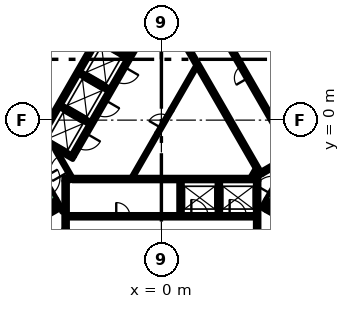
"""IFC4 building model, lengths in metres.
Left out: names, types, materials, properties, quantities, classifications, styles, units other than length and angle.
Written with IfcOpenShell. Run it as: python <this file> out.ifc"""

import sys

from ifc_helpers import new_model, si_unit, direction, frame, frame_2d, origin, place, context, subcontext, project, spatial, polyline, rectangle, outline, extrude, element, fill, save


model = new_model("IFC4")
c1 = context("Model", 3, precision=1e-05, world=origin(), true_north=direction((0.0, 1.0)))
c2 = subcontext(c1, "Body", "Model", "MODEL_VIEW")
j1 = project(units=[si_unit("LENGTHUNIT", "METRE"), si_unit("PLANEANGLEUNIT", "RADIAN")], contexts=[c1])
p1 = place(None, origin())
s1 = spatial("IfcSite", under=j1, at=p1, CompositionType="ELEMENT")
p2 = place(p1, origin())
s2 = spatial("IfcBuilding", under=s1, at=p2, CompositionType="ELEMENT")
p3 = place(p2, origin())
s3 = spatial("IfcBuildingStorey", under=s2, at=p3, CompositionType="ELEMENT", Elevation=0.0)
p4 = place(p3, frame((6.776, 13.364, -1.8), z_axis=(0.0, 0.0, 1.0), x_axis=(0.500004177138, -0.8660229921, 0.0)))
e1 = element("IfcWall", 1, at=p4, inside=s3, PredefinedType="SOLIDWALL", context=c2, shape_type="SweptSolid", body=[
    extrude(rectangle(XDim=20.204, YDim=0.9, at=frame_2d((10.102, 0.0))), origin(), (0.0, 0.0, 1.0), 7.8),
])
p5 = place(p3, frame((-15.36, -1.503, -1.8), z_axis=(0.0, 0.0, 1.0), x_axis=(0.50000389221, 0.866023156604, 0.0)))
e2 = element("IfcWall", 2, at=p5, inside=s3, PredefinedType="SOLIDWALL", context=c2, shape_type="SweptSolid", body=[
    extrude(rectangle(XDim=21.0, YDim=0.9, at=frame_2d((10.5, 0.0))), origin(), (0.0, 0.0, 1.0), 7.8),
])
p6 = place(p3, frame((12.84, -9.261, 0.0), z_axis=(0.0, 0.0, 1.0), x_axis=(-0.866013990052, 0.500019768644, 0.0)))
e3 = element("IfcWall", 3, at=p6, inside=s3, PredefinedType="SOLIDWALL", context=c2, shape_type="SweptSolid", body=[
    extrude(rectangle(XDim=6.8, YDim=0.25, at=frame_2d((3.4, 0.0))), origin(), (0.0, 0.0, 1.0), 6.0),
])
p7 = place(p3, frame((6.78, -5.906, 0.0), z_axis=(0.0, 0.0, 1.0), x_axis=(0.500223362819, 0.865896406789, 0.0)))
e4 = element("IfcWall", 4, at=p7, inside=s3, PredefinedType="SOLIDWALL", context=c2, shape_type="SweptSolid", body=[
    extrude(rectangle(XDim=0.675, YDim=0.25, at=frame_2d((0.337, 0.0))), origin(), (0.0, 0.0, 1.0), 6.0),
])
p8 = place(p3, frame((-12.84, -9.261, 0.0), z_axis=(0.0, 0.0, 1.0), x_axis=(0.866016039709, 0.500016218704, 0.0)))
e5 = element("IfcWall", 5, at=p8, inside=s3, PredefinedType="SOLIDWALL", context=c2, shape_type="SweptSolid", body=[
    extrude(rectangle(XDim=7.05, YDim=0.25, at=frame_2d((3.525, 0.0))), origin(), (0.0, 0.0, 1.0), 6.0),
])
p9 = place(p3, frame((-6.905, -5.69, 0.0), z_axis=(0.0, 0.0, 1.0), x_axis=(-0.500402024738, 0.865793170242, 0.0)))
e6 = element("IfcWall", 6, at=p9, inside=s3, PredefinedType="SOLIDWALL", context=c2, shape_type="SweptSolid", body=[
    extrude(rectangle(XDim=0.425, YDim=0.25, at=frame_2d((0.212, 0.0))), origin(), (0.0, 0.0, 1.0), 6.0),
])
p10 = place(p3, frame((-5.845, -3.875, -1.8), z_axis=(0.0, 0.0, 1.0), x_axis=(1.0, 0.0, 0.0)))
e7 = element("IfcWall", 7, at=p10, inside=s3, PredefinedType="SOLIDWALL", context=c2, shape_type="SweptSolid", body=[
    extrude(rectangle(XDim=12.27, YDim=0.25, at=frame_2d((6.135, 0.0))), origin(), (0.0, 0.0, 1.0), 7.8),
])
p11 = place(p3, frame((-6.425, -3.875, -1.8), z_axis=(0.0, 0.0, 1.0), x_axis=(1.0, 0.0, 0.0)))
e8 = element("IfcWall", 8, at=p11, inside=s3, PredefinedType="SOLIDWALL", context=c2, shape_type="SweptSolid", body=[
    extrude(rectangle(XDim=0.428, YDim=0.25, at=frame_2d((0.214, 0.0))), origin(), (0.0, 0.0, 1.0), 7.8),
])
p12 = place(p3, frame((6.3, -7.268, -1.8), z_axis=(0.0, 0.0, 1.0), x_axis=(0.0, 1.0, 0.0)))
e9 = element("IfcWall", 9, at=p12, inside=s3, PredefinedType="SOLIDWALL", context=c2, shape_type="SweptSolid", body=[
    extrude(rectangle(XDim=3.268, YDim=0.25, at=frame_2d((1.634, 0.0))), origin(), (0.0, 0.0, 1.0), 7.8),
])
for number, where, z_axis, x_axis in (
    (10, (3.78, -4.0, -1.8), (0.0, 0.0, 1.0), (0.0, -1.0, 0.0)),
    (11, (1.26, -4.0, -1.8), (0.0, 0.0, 1.0), (0.0, -1.0, 0.0)),
):
    element("IfcWall", number, at=place(p3, frame(where, z_axis=z_axis, x_axis=x_axis)), inside=s3, PredefinedType="SOLIDWALL", context=c2, shape_type="SweptSolid", body=[
        extrude(rectangle(XDim=2.2, YDim=0.25, at=frame_2d((1.1, 0.0))), origin(), (0.0, 0.0, 1.0), 7.8),
    ])
p13 = place(p3, frame((-6.3, -4.0, -1.8), z_axis=(0.0, 0.0, 1.0), x_axis=(0.0, -1.0, 0.0)))
e12 = element("IfcWall", 12, at=p13, inside=s3, PredefinedType="SOLIDWALL", context=c2, shape_type="SweptSolid", body=[
    extrude(rectangle(XDim=3.154, YDim=0.25, at=frame_2d((1.577, 0.0))), origin(), (0.0, 0.0, 1.0), 7.8),
])
p14 = place(p3, frame((0.0, 0.0, -1.8)))
e13 = element("IfcWall", 13, at=p14, inside=s3, PredefinedType="SOLIDWALL", context=c2, shape_type="SweptSolid", body=[
    extrude(outline(polyline([(0.335, 6.925), (0.335, 7.075), (0.335, 7.075), (0.335, 7.075), (0.245, 7.075), (0.079, 7.363), (0.035, 7.439), (0.252, 7.564), (0.377, 7.348), (6.552, -3.348), (6.677, -3.564), (6.46, -3.689), (4.897, -0.981), (0.332, 6.925), (0.335, 6.925), (0.335, 6.925), (0.335, 6.925)])), origin(), (0.0, 0.0, 1.0), 7.8),
])
p15 = place(p3, frame((6.614, -3.456, -1.8), z_axis=(0.0, 0.0, 1.0), x_axis=(0.86602447079, 0.500001615989, 0.0)))
e14 = element("IfcWall", 14, at=p15, inside=s3, PredefinedType="SOLIDWALL", context=c2, shape_type="SweptSolid", body=[
    extrude(rectangle(XDim=3.154, YDim=0.25, at=frame_2d((1.577, 0.0))), origin(), (0.0, 0.0, 1.0), 7.8),
])
p16 = place(p3, frame((-8.06, -1.311, -1.8), z_axis=(0.0, 0.0, 1.0), x_axis=(0.50000273126, 0.866023826885, 0.0)))
e15 = element("IfcWall", 15, at=p16, inside=s3, PredefinedType="SOLIDWALL", context=c2, shape_type="SweptSolid", body=[
    extrude(rectangle(XDim=10.33, YDim=0.25, at=frame_2d((5.165, 0.0))), origin(), (0.0, 0.0, 1.0), 7.8),
])
for number, where, z_axis, x_axis in (
    (16, (-2.204, 4.182, -1.8), (0.0, 0.0, 1.0), (-0.866, 0.5, 0.0)),
    (17, (-5.369, 3.1, -1.8), (0.0, 0.0, 1.0), (0.866, -0.5, 0.0)),
    (18, (-4.724, -0.182, -1.8), (0.0, 0.0, 1.0), (-0.866, 0.5, 0.0)),
):
    element("IfcWall", number, at=place(p3, frame(where, z_axis=z_axis, x_axis=x_axis)), inside=s3, PredefinedType="SOLIDWALL", context=c2, shape_type="SweptSolid", body=[
        extrude(rectangle(XDim=2.2, YDim=0.25, at=frame_2d((1.1, 0.0))), origin(), (0.0, 0.0, 1.0), 7.8),
    ])
e19 = element("IfcWall", 19, at=p14, inside=s3, PredefinedType="SOLIDWALL", context=c2, shape_type="SweptSolid", body=[
    extrude(outline(polyline([(-5.922, -2.257), (-5.922, -2.257), (-5.705, -2.382), (-5.83, -2.598), (-6.829, -2.021), (-6.88, -1.934), (-6.88, -1.934), (-6.93, -1.963), (-7.952, -1.373), (-7.827, -1.156), (-5.922, -2.257)])), origin(), (0.0, 0.0, 1.0), 7.8),
])
p17 = place(p3, frame((-6.48, -6.027, -1.8), z_axis=(0.0, 0.0, 1.0), x_axis=(-0.499927229454, 0.866067413802, 0.0)))
e20 = element("IfcWall", 20, at=p17, inside=s3, PredefinedType="PARTITIONING", context=c2, shape_type="SweptSolid", body=[
    extrude(rectangle(XDim=0.929, YDim=0.15, at=frame_2d((0.464, 0.0))), origin(), (0.0, 0.0, 1.0), 7.8),
])
p18 = place(p3, frame((6.945, -5.222, 0.0), z_axis=(0.0, 0.0, 1.0), x_axis=(-0.499818422106, -0.866130212453, 0.0)))
e21 = element("IfcWall", 21, at=p18, inside=s3, PredefinedType="PARTITIONING", context=c2, shape_type="SweptSolid", body=[
    extrude(rectangle(XDim=0.514, YDim=0.15, at=frame_2d((0.257, 0.0))), origin(), (0.0, 0.0, 1.0), 5.1),
])
p19 = place(p3, frame((5.936, -3.718, 0.0), z_axis=(0.0, 0.0, 1.0), x_axis=(0.499890179513, 0.866088799389, 0.0)))
e22 = element("IfcWall", 22, at=p19, inside=s3, PredefinedType="PARTITIONING", context=c2, shape_type="SweptSolid", body=[
    extrude(rectangle(XDim=0.504, YDim=0.15, at=frame_2d((0.252, 0.0))), origin(), (0.0, 0.0, 1.0), 5.1),
])
for number, where, z_axis, x_axis in (
    (23, (-1.887, -3.718, 0.0), (0.0, 0.0, 1.0), (0.5, 0.866, 0.0)),
    (24, (0.645, 0.667, 0.0), (0.0, 0.0, 1.0), (0.5, 0.866, 0.0)),
):
    element("IfcWall", number, at=place(p3, frame(where, z_axis=z_axis, x_axis=x_axis)), inside=s3, PredefinedType="PARTITIONING", context=c2, shape_type="SweptSolid", body=[
        extrude(rectangle(XDim=3.263, YDim=0.15, at=frame_2d((1.632, 0.0))), origin(), (0.0, 0.0, 1.0), 5.1),
    ])
p20 = place(p3, frame((-6.175, -6.325, -1.8), z_axis=(0.0, 0.0, 1.0), x_axis=(1.0, 0.0, 0.0)))
e25 = element("IfcWall", 25, at=p20, inside=s3, PredefinedType="SOLIDWALL", context=c2, shape_type="SweptSolid", body=[
    extrude(rectangle(XDim=12.35, YDim=0.25, at=frame_2d((6.175, 0.0))), origin(), (0.0, 0.0, 1.0), 7.8),
])
p21 = place(p20, frame((3.205, 0.0, 1.8)))
e26 = element("IfcOpeningElement", 26, at=p21, cuts=e25, PredefinedType="OPENING", context=c2, shape_type="SweptSolid", body=[
    extrude(rectangle(XDim=0.9, YDim=2.1, at=frame_2d((0.45, 1.05))), frame((0.0, 0.135, 0.0), z_axis=(0.0, -1.0, 0.0), x_axis=(1.0, 0.0, 0.0)), (0.0, 0.0, 1.0), 0.27),
])
p22 = place(p20, frame((8.145, 0.0, 1.8)))
e27 = element("IfcOpeningElement", 27, at=p22, cuts=e25, PredefinedType="OPENING", context=c2, shape_type="SweptSolid", body=[
    extrude(rectangle(XDim=1.1, YDim=2.1, at=frame_2d((0.55, 1.05))), frame((0.0, 0.135, 0.0), z_axis=(0.0, -1.0, 0.0), x_axis=(1.0, 0.0, 0.0)), (0.0, 0.0, 1.0), 0.27),
])
p23 = place(p20, frame((10.665, 0.0, 1.8)))
e28 = element("IfcOpeningElement", 28, at=p23, cuts=e25, PredefinedType="OPENING", context=c2, shape_type="SweptSolid", body=[
    extrude(rectangle(XDim=1.1, YDim=2.1, at=frame_2d((0.55, 1.05))), frame((0.0, 0.135, 0.0), z_axis=(0.0, -1.0, 0.0), x_axis=(1.0, 0.0, 0.0)), (0.0, 0.0, 1.0), 0.27),
])
p24 = place(p3, frame((11.553, -0.46, -1.8), z_axis=(0.0, 0.0, 1.0), x_axis=(-0.500006514828, 0.866021642414, 0.0)))
e29 = element("IfcWall", 29, at=p24, inside=s3, PredefinedType="SOLIDWALL", context=c2, shape_type="SweptSolid", body=[
    extrude(rectangle(XDim=12.35, YDim=0.25, at=frame_2d((6.175, 0.0))), origin(), (0.0, 0.0, 1.0), 7.8),
])
p25 = place(p24, frame((0.585, 0.0, 1.8)))
e30 = element("IfcOpeningElement", 30, at=p25, cuts=e29, PredefinedType="OPENING", context=c2, shape_type="SweptSolid", body=[
    extrude(rectangle(XDim=1.1, YDim=2.1, at=frame_2d((0.55, 1.05))), frame((0.0, 0.135, 0.0), z_axis=(0.0, -1.0, 0.0), x_axis=(1.0, 0.0, 0.0)), (0.0, 0.0, 1.0), 0.27),
])
p26 = place(p24, frame((3.105, 0.0, 1.8)))
e31 = element("IfcOpeningElement", 31, at=p26, cuts=e29, PredefinedType="OPENING", context=c2, shape_type="SweptSolid", body=[
    extrude(rectangle(XDim=1.1, YDim=2.1, at=frame_2d((0.55, 1.05))), frame((0.0, 0.135, 0.0), z_axis=(0.0, -1.0, 0.0), x_axis=(1.0, 0.0, 0.0)), (0.0, 0.0, 1.0), 0.27),
])
p27 = place(p24, frame((5.625, 0.0, 1.8)))
e32 = element("IfcOpeningElement", 32, at=p27, cuts=e29, PredefinedType="OPENING", context=c2, shape_type="SweptSolid", body=[
    extrude(rectangle(XDim=1.1, YDim=2.1, at=frame_2d((0.55, 1.05))), frame((0.0, 0.135, 0.0), z_axis=(0.0, -1.0, 0.0), x_axis=(1.0, 0.0, 0.0)), (0.0, 0.0, 1.0), 0.27),
])
p28 = place(p24, frame((8.145, 0.0, 1.8)))
e33 = element("IfcOpeningElement", 33, at=p28, cuts=e29, PredefinedType="OPENING", context=c2, shape_type="SweptSolid", body=[
    extrude(rectangle(XDim=1.1, YDim=2.1, at=frame_2d((0.55, 1.05))), frame((0.0, 0.135, 0.0), z_axis=(0.0, -1.0, 0.0), x_axis=(1.0, 0.0, 0.0)), (0.0, 0.0, 1.0), 0.27),
])
p29 = place(p24, frame((10.665, 0.0, 1.8)))
e34 = element("IfcOpeningElement", 34, at=p29, cuts=e29, PredefinedType="OPENING", context=c2, shape_type="SweptSolid", body=[
    extrude(rectangle(XDim=1.1, YDim=2.1, at=frame_2d((0.55, 1.05))), frame((0.0, 0.135, 0.0), z_axis=(0.0, -1.0, 0.0), x_axis=(1.0, 0.0, 0.0)), (0.0, 0.0, 1.0), 0.27),
])
p30 = place(p3, frame((8.565, -2.185, -1.8), z_axis=(0.0, 0.0, 1.0), x_axis=(-0.499997954832, 0.866026584559, 0.0)))
e35 = element("IfcWall", 35, at=p30, inside=s3, PredefinedType="SOLIDWALL", context=c2, shape_type="SweptSolid", body=[
    extrude(rectangle(XDim=12.35, YDim=0.25, at=frame_2d((6.175, 0.0))), origin(), (0.0, 0.0, 1.0), 7.8),
])
p31 = place(p30, frame((5.725, 0.0, 1.8)))
e36 = element("IfcOpeningElement", 36, at=p31, cuts=e35, PredefinedType="OPENING", context=c2, shape_type="SweptSolid", body=[
    extrude(rectangle(XDim=0.9, YDim=2.1, at=frame_2d((0.45, 1.05))), frame((0.0, 0.135, 0.0), z_axis=(0.0, -1.0, 0.0), x_axis=(1.0, 0.0, 0.0)), (0.0, 0.0, 1.0), 0.27),
])
p32 = place(p3, frame((-6.008, 9.144, -1.8), z_axis=(0.0, 0.0, 1.0), x_axis=(-0.500006956611, -0.866021387346, 0.0)))
e37 = element("IfcWall", 37, at=p32, inside=s3, PredefinedType="SOLIDWALL", context=c2, shape_type="SweptSolid", body=[
    extrude(rectangle(XDim=9.83, YDim=0.25, at=frame_2d((4.915, 0.0))), origin(), (0.0, 0.0, 1.0), 7.8),
])
p33 = place(p32, frame((0.585, 0.0, 1.8)))
e38 = element("IfcOpeningElement", 38, at=p33, cuts=e37, PredefinedType="OPENING", context=c2, shape_type="SweptSolid", body=[
    extrude(rectangle(XDim=1.1, YDim=2.1, at=frame_2d((0.55, 1.05))), frame((0.0, 0.135, 0.0), z_axis=(0.0, -1.0, 0.0), x_axis=(1.0, 0.0, 0.0)), (0.0, 0.0, 1.0), 0.27),
])
p34 = place(p32, frame((3.105, 0.0, 1.8)))
e39 = element("IfcOpeningElement", 39, at=p34, cuts=e37, PredefinedType="OPENING", context=c2, shape_type="SweptSolid", body=[
    extrude(rectangle(XDim=1.1, YDim=2.1, at=frame_2d((0.55, 1.05))), frame((0.0, 0.135, 0.0), z_axis=(0.0, -1.0, 0.0), x_axis=(1.0, 0.0, 0.0)), (0.0, 0.0, 1.0), 0.27),
])
p35 = place(p32, frame((6.985, 0.0, 1.8)))
e40 = element("IfcOpeningElement", 40, at=p35, cuts=e37, PredefinedType="OPENING", context=c2, shape_type="SweptSolid", body=[
    extrude(rectangle(XDim=0.9, YDim=2.1, at=frame_2d((0.45, 1.05))), frame((0.0, 0.135, 0.0), z_axis=(0.0, -1.0, 0.0), x_axis=(1.0, 0.0, 0.0)), (0.0, 0.0, 1.0), 0.27),
])
p36 = place(p3, frame((-0.898, 6.194, -1.8), z_axis=(0.0, 0.0, 1.0), x_axis=(-0.499996202215, -0.866027596426, 0.0)))
e41 = element("IfcWall", 41, at=p36, inside=s3, PredefinedType="SOLIDWALL", context=c2, shape_type="SweptSolid", body=[
    extrude(rectangle(XDim=9.83, YDim=0.25, at=frame_2d((4.915, 0.0))), origin(), (0.0, 0.0, 1.0), 7.8),
])
p37 = place(p36, frame((0.585, 0.0, 1.8)))
e42 = element("IfcOpeningElement", 42, at=p37, cuts=e41, PredefinedType="OPENING", context=c2, shape_type="SweptSolid", body=[
    extrude(rectangle(XDim=1.1, YDim=2.1, at=frame_2d((0.55, 1.05))), frame((0.0, 0.135, 0.0), z_axis=(0.0, -1.0, 0.0), x_axis=(1.0, 0.0, 0.0)), (0.0, 0.0, 1.0), 0.27),
])
p38 = place(p36, frame((3.105, 0.0, 1.8)))
e43 = element("IfcOpeningElement", 43, at=p38, cuts=e41, PredefinedType="OPENING", context=c2, shape_type="SweptSolid", body=[
    extrude(rectangle(XDim=1.1, YDim=2.1, at=frame_2d((0.55, 1.05))), frame((0.0, 0.135, 0.0), z_axis=(0.0, -1.0, 0.0), x_axis=(1.0, 0.0, 0.0)), (0.0, 0.0, 1.0), 0.27),
])
p39 = place(p36, frame((5.625, 0.0, 1.8)))
e44 = element("IfcOpeningElement", 44, at=p39, cuts=e41, PredefinedType="OPENING", context=c2, shape_type="SweptSolid", body=[
    extrude(rectangle(XDim=1.1, YDim=2.1, at=frame_2d((0.55, 1.05))), frame((0.0, 0.135, 0.0), z_axis=(0.0, -1.0, 0.0), x_axis=(1.0, 0.0, 0.0)), (0.0, 0.0, 1.0), 0.27),
])
p40 = place(p36, frame((8.145, 0.0, 1.8)))
e45 = element("IfcOpeningElement", 45, at=p40, cuts=e41, PredefinedType="OPENING", context=c2, shape_type="SweptSolid", body=[
    extrude(rectangle(XDim=1.1, YDim=2.1, at=frame_2d((0.55, 1.05))), frame((0.0, 0.135, 0.0), z_axis=(0.0, -1.0, 0.0), x_axis=(1.0, 0.0, 0.0)), (0.0, 0.0, 1.0), 0.27),
])
p41 = place(p3, frame((7.053, -5.284, 0.0), z_axis=(0.0, 0.0, 1.0), x_axis=(0.500078061341, 0.865980330357, 0.0)))
e46 = element("IfcWall", 46, at=p41, inside=s3, PredefinedType="SOLIDWALL", context=c2, shape_type="SweptSolid", body=[
    extrude(rectangle(XDim=2.1, YDim=0.4, at=frame_2d((1.05, 0.0))), origin(), (0.0, 0.0, 1.0), 6.0),
])
p42 = place(p41, frame((0.45, 0.0, 0.0)))
e47 = element("IfcOpeningElement", 47, at=p42, cuts=e46, PredefinedType="OPENING", context=c2, shape_type="SweptSolid", body=[
    extrude(rectangle(XDim=1.2, YDim=2.1, at=frame_2d((0.6, 1.05))), frame((0.0, 0.21, 0.0), z_axis=(0.0, -1.0, 0.0), x_axis=(1.0, 0.0, 0.0)), (0.0, 0.0, 1.0), 0.42),
])
p43 = place(p3, frame((-8.103, -3.466, 0.0), z_axis=(0.0, 0.0, 1.0), x_axis=(0.500078061341, -0.865980330357, 0.0)))
e48 = element("IfcWall", 48, at=p43, inside=s3, PredefinedType="SOLIDWALL", context=c2, shape_type="SweptSolid", body=[
    extrude(rectangle(XDim=2.1, YDim=0.4, at=frame_2d((1.05, 0.0))), origin(), (0.0, 0.0, 1.0), 6.0),
])
p44 = place(p43, frame((0.45, 0.0, 0.0)))
e49 = element("IfcOpeningElement", 49, at=p44, cuts=e48, PredefinedType="OPENING", context=c2, shape_type="SweptSolid", body=[
    extrude(rectangle(XDim=1.2, YDim=2.1, at=frame_2d((0.6, 1.05))), frame((0.0, 0.21, 0.0), z_axis=(0.0, -1.0, 0.0), x_axis=(1.0, 0.0, 0.0)), (0.0, 0.0, 1.0), 0.42),
])
p45 = place(p3, frame((-6.3, -7.154, -1.8), z_axis=(0.0, 0.0, 1.0), x_axis=(0.0, -1.0, 0.0)))
e50 = element("IfcWall", 50, at=p45, inside=s3, PredefinedType="SOLIDWALL", context=c2, shape_type="SweptSolid", body=[
    extrude(rectangle(XDim=1.8, YDim=0.25, at=frame_2d((0.9, 0.0))), origin(), (0.0, 0.0, 1.0), 7.8),
])
p46 = place(p45, frame((0.45, 0.0, 1.8)))
e51 = element("IfcOpeningElement", 51, at=p46, cuts=e50, PredefinedType="OPENING", context=c2, shape_type="SweptSolid", body=[
    extrude(rectangle(XDim=0.9, YDim=2.1, at=frame_2d((0.45, 1.05))), frame((0.0, 0.135, 0.0), z_axis=(0.0, -1.0, 0.0), x_axis=(1.0, 0.0, 0.0)), (0.0, 0.0, 1.0), 0.27),
])
p47 = place(p3, frame((-5.895, -3.79, 0.0), z_axis=(0.0, 0.0, 1.0), x_axis=(-0.49994051562, 0.866059744384, 0.0)))
e52 = element("IfcWall", 52, at=p47, inside=s3, PredefinedType="PARTITIONING", context=c2, shape_type="SweptSolid", body=[
    extrude(rectangle(XDim=2.1, YDim=0.15, at=frame_2d((1.05, 0.0))), origin(), (0.0, 0.0, 1.0), 5.1),
])
p48 = place(p47, frame((0.45, 0.0, 0.0)))
e53 = element("IfcOpeningElement", 53, at=p48, cuts=e52, PredefinedType="OPENING", context=c2, shape_type="SweptSolid", body=[
    extrude(rectangle(XDim=1.2, YDim=2.1, at=frame_2d((0.6, 1.05))), frame((0.0, 0.085, 0.0), z_axis=(0.0, -1.0, 0.0), x_axis=(1.0, 0.0, 0.0)), (0.0, 0.0, 1.0), 0.17),
])
p49 = place(p3, frame((-0.255, -0.892, 0.0), z_axis=(0.0, 0.0, 1.0), x_axis=(0.500062916607, 0.865989075817, 0.0)))
e54 = element("IfcWall", 54, at=p49, inside=s3, PredefinedType="PARTITIONING", context=c2, shape_type="SweptSolid", body=[
    extrude(rectangle(XDim=1.8, YDim=0.15, at=frame_2d((0.9, 0.0))), origin(), (0.0, 0.0, 1.0), 5.1),
])
p50 = place(p49, frame((0.45, 0.0, 0.0)))
e55 = element("IfcOpeningElement", 55, at=p50, cuts=e54, PredefinedType="OPENING", context=c2, shape_type="SweptSolid", body=[
    extrude(rectangle(XDim=0.9, YDim=2.1, at=frame_2d((0.45, 1.05))), frame((0.0, 0.085, 0.0), z_axis=(0.0, -1.0, 0.0), x_axis=(1.0, 0.0, 0.0)), (0.0, 0.0, 1.0), 0.17),
])
p51 = place(p21, origin())
e56 = element("IfcDoor", 56, at=p51, inside=s3, OperationType="SINGLE_SWING_LEFT", PredefinedType="DOOR", context=c2, shape_type="SweptSolid", body=[
    extrude(rectangle(XDim=0.9, YDim=2.1, at=frame_2d((0.45, 1.05))), frame((0.0, 0.025, 0.0), z_axis=(0.0, -1.0, 0.0), x_axis=(1.0, 0.0, 0.0)), (0.0, 0.0, 1.0), 0.05),
])
fill(e26, e56)
p52 = place(p22, origin())
e57 = element("IfcDoor", 57, at=p52, inside=s3, OperationType="DOUBLE_DOOR_SLIDING", PredefinedType="DOOR", context=c2, shape_type="SweptSolid", body=[
    extrude(rectangle(XDim=1.1, YDim=2.1, at=frame_2d((0.55, 1.05))), frame((0.0, 0.025, 0.0), z_axis=(0.0, -1.0, 0.0), x_axis=(1.0, 0.0, 0.0)), (0.0, 0.0, 1.0), 0.05),
])
fill(e27, e57)
p53 = place(p23, origin())
e58 = element("IfcDoor", 58, at=p53, inside=s3, OperationType="DOUBLE_DOOR_SLIDING", PredefinedType="DOOR", context=c2, shape_type="SweptSolid", body=[
    extrude(rectangle(XDim=1.1, YDim=2.1, at=frame_2d((0.55, 1.05))), frame((0.0, 0.025, 0.0), z_axis=(0.0, -1.0, 0.0), x_axis=(1.0, 0.0, 0.0)), (0.0, 0.0, 1.0), 0.05),
])
fill(e28, e58)
p54 = place(p31, origin())
e59 = element("IfcDoor", 59, at=p54, inside=s3, OperationType="SINGLE_SWING_LEFT", PredefinedType="DOOR", context=c2, shape_type="SweptSolid", body=[
    extrude(rectangle(XDim=0.9, YDim=2.1, at=frame_2d((0.45, 1.05))), frame((0.0, 0.025, 0.0), z_axis=(0.0, -1.0, 0.0), x_axis=(1.0, 0.0, 0.0)), (0.0, 0.0, 1.0), 0.05),
])
fill(e36, e59)
p55 = place(p38, origin())
e60 = element("IfcDoor", 60, at=p55, inside=s3, OperationType="DOUBLE_DOOR_SLIDING", PredefinedType="DOOR", context=c2, shape_type="SweptSolid", body=[
    extrude(rectangle(XDim=1.1, YDim=2.1, at=frame_2d((0.55, 1.05))), frame((0.0, 0.025, 0.0), z_axis=(0.0, -1.0, 0.0), x_axis=(1.0, 0.0, 0.0)), (0.0, 0.0, 1.0), 0.05),
])
fill(e43, e60)
p56 = place(p39, origin())
e61 = element("IfcDoor", 61, at=p56, inside=s3, OperationType="DOUBLE_DOOR_SLIDING", PredefinedType="DOOR", context=c2, shape_type="SweptSolid", body=[
    extrude(rectangle(XDim=1.1, YDim=2.1, at=frame_2d((0.55, 1.05))), frame((0.0, 0.025, 0.0), z_axis=(0.0, -1.0, 0.0), x_axis=(1.0, 0.0, 0.0)), (0.0, 0.0, 1.0), 0.05),
])
fill(e44, e61)
p57 = place(p40, origin())
e62 = element("IfcDoor", 62, at=p57, inside=s3, OperationType="DOUBLE_DOOR_SLIDING", PredefinedType="DOOR", context=c2, shape_type="SweptSolid", body=[
    extrude(rectangle(XDim=1.1, YDim=2.1, at=frame_2d((0.55, 1.05))), frame((0.0, 0.025, 0.0), z_axis=(0.0, -1.0, 0.0), x_axis=(1.0, 0.0, 0.0)), (0.0, 0.0, 1.0), 0.05),
])
fill(e45, e62)
p58 = place(p48, origin())
e63 = element("IfcDoor", 63, at=p58, inside=s3, OperationType="SINGLE_SWING_LEFT", PredefinedType="DOOR", context=c2, shape_type="SweptSolid", body=[
    extrude(rectangle(XDim=1.2, YDim=2.1, at=frame_2d((0.6, 1.05))), frame((0.0, 0.025, 0.0), z_axis=(0.0, -1.0, 0.0), x_axis=(1.0, 0.0, 0.0)), (0.0, 0.0, 1.0), 0.05),
])
fill(e53, e63)
p59 = place(p50, origin())
e64 = element("IfcDoor", 64, at=p59, inside=s3, OperationType="SINGLE_SWING_LEFT", PredefinedType="DOOR", context=c2, shape_type="SweptSolid", body=[
    extrude(rectangle(XDim=0.9, YDim=2.1, at=frame_2d((0.45, 1.05))), frame((0.0, 0.025, 0.0), z_axis=(0.0, -1.0, 0.0), x_axis=(1.0, 0.0, 0.0)), (0.0, 0.0, 1.0), 0.05),
])
fill(e55, e64)
save(model, sys.argv[1])
